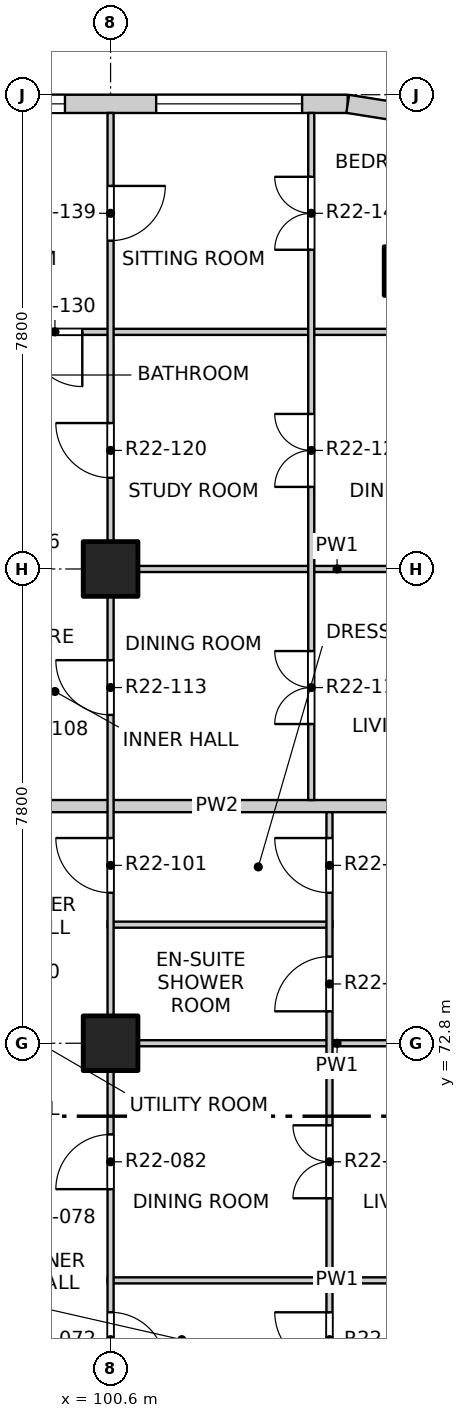
"""IFC4 building model, lengths in metres.
Left out: names, types, materials, properties, quantities, classifications, styles, units other than length and angle.
Written with IfcOpenShell. Run it as: python <this file> out.ifc"""

import sys

from ifc_helpers import new_model, si_unit, direction, frame, frame_2d, origin, origin_2d, place, context, subcontext, project, spatial, rectangle, extrude, element, fill, save


model = new_model("IFC4")
c1 = context("Model", 3, precision=1e-05, world=origin(), true_north=direction((0.0, 1.0)))
c2 = subcontext(c1, "Body", "Model", "MODEL_VIEW")
j1 = project(units=[si_unit("LENGTHUNIT", "METRE"), si_unit("PLANEANGLEUNIT", "RADIAN")], contexts=[c1])
p1 = place(None, origin())
s1 = spatial("IfcSite", under=j1, at=p1, CompositionType="ELEMENT")
p2 = place(p1, origin())
s2 = spatial("IfcBuilding", under=s1, at=p2, CompositionType="ELEMENT")
p3 = place(p2, frame((0.0, 0.0, 224.5)))
s3 = spatial("IfcBuildingStorey", under=s2, at=p3, CompositionType="ELEMENT", Elevation=224.5)
p4 = place(p3, frame((105.5, 85.5, -0.25), z_axis=(0.0, 0.0, 1.0), x_axis=(1.0, 0.0, 0.0)))
e1 = element("IfcColumn", 1, at=p4, inside=s3, PredefinedType="COLUMN", context=c2, shape_type="SweptSolid", body=[
    extrude(rectangle(XDim=0.8, YDim=0.8, at=origin_2d()), origin(), (0.0, 0.0, 1.0), 3.4),
])
for number, where, z_axis, x_axis in (
    (2, (100.6, 72.8, -0.25), (0.0, 0.0, 1.0), (1.0, 0.0, 0.0)),
    (3, (100.6, 80.6, -0.25), (0.0, 0.0, 1.0), (1.0, 0.0, 0.0)),
):
    element("IfcColumn", number, at=place(p3, frame(where, z_axis=z_axis, x_axis=x_axis)), inside=s3, PredefinedType="COLUMN", context=c2, shape_type="SweptSolid", body=[
        extrude(rectangle(XDim=0.9, YDim=0.9, at=origin_2d()), origin(), (0.0, 0.0, 1.0), 3.4),
    ])
p5 = place(p3, frame((97.1, 88.25, 0.0), z_axis=(0.0, 0.0, 1.0), x_axis=(1.0, 0.0, 0.0)))
e4 = element("IfcWall", 4, at=p5, inside=s3, PredefinedType="SOLIDWALL", context=c2, shape_type="SweptSolid", body=[
    extrude(rectangle(XDim=7.4, YDim=0.3, at=frame_2d((3.7, 0.0))), origin(), (0.0, 0.0, 1.0), 2.7),
])
p6 = place(p5, frame((0.35, 0.0, 0.9)))
e5 = element("IfcOpeningElement", 5, at=p6, cuts=e4, PredefinedType="OPENING", context=c2, shape_type="SweptSolid", body=[
    extrude(rectangle(XDim=2.4, YDim=1.8, at=frame_2d((1.2, 0.9))), frame((0.0, 0.16, 0.0), z_axis=(0.0, -1.0, 0.0), x_axis=(1.0, 0.0, 0.0)), (0.0, 0.0, 1.0), 0.32),
])
p7 = place(p5, frame((4.25, 0.0, 0.9)))
e6 = element("IfcOpeningElement", 6, at=p7, cuts=e4, PredefinedType="OPENING", context=c2, shape_type="SweptSolid", body=[
    extrude(rectangle(XDim=2.4, YDim=1.8, at=frame_2d((1.2, 0.9))), frame((0.0, 0.16, 0.0), z_axis=(0.0, -1.0, 0.0), x_axis=(1.0, 0.0, 0.0)), (0.0, 0.0, 1.0), 0.32),
])
p8 = place(p3, frame((105.659, 88.066, 0.0), z_axis=(0.0, 0.0, 1.0), x_axis=(-0.987678452879, 0.156496880861, 0.0)))
e7 = element("IfcWall", 7, at=p8, inside=s3, PredefinedType="SOLIDWALL", context=c2, shape_type="SweptSolid", body=[
    extrude(rectangle(XDim=1.173, YDim=0.3, at=frame_2d((0.586, 0.0))), origin(), (0.0, 0.0, 1.0), 2.7),
])
p9 = place(p3, frame((100.55, 68.9, 0.0), z_axis=(0.0, 0.0, 1.0), x_axis=(1.0, 0.0, 0.0)))
e8 = element("IfcWall", 8, at=p9, inside=s3, PredefinedType="PARTITIONING", context=c2, shape_type="SweptSolid", body=[
    extrude(rectangle(XDim=7.55, YDim=0.1, at=frame_2d((3.775, 0.0))), origin(), (0.0, 0.0, 1.0), 2.55),
])
p10 = place(p3, frame((100.55, 72.8, 0.0), z_axis=(0.0, 0.0, 1.0), x_axis=(1.0, 0.0, 0.0)))
e9 = element("IfcWall", 9, at=p10, inside=s3, PredefinedType="PARTITIONING", context=c2, shape_type="SweptSolid", body=[
    extrude(rectangle(XDim=7.55, YDim=0.1, at=frame_2d((3.775, 0.0))), origin(), (0.0, 0.0, 1.0), 3.15),
])
p11 = place(p3, frame((100.55, 74.75, 0.0), z_axis=(0.0, 0.0, 1.0), x_axis=(1.0, 0.0, 0.0)))
e10 = element("IfcWall", 10, at=p11, inside=s3, PredefinedType="PARTITIONING", context=c2, shape_type="SweptSolid", body=[
    extrude(rectangle(XDim=3.7, YDim=0.1, at=frame_2d((1.85, 0.0))), origin(), (0.0, 0.0, 1.0), 3.15),
])
p12 = place(p3, frame((96.6, 76.7, 0.0), z_axis=(0.0, 0.0, 1.0), x_axis=(1.0, 0.0, 0.0)))
e11 = element("IfcWall", 11, at=p12, inside=s3, PredefinedType="PARTITIONING", context=c2, shape_type="SweptSolid", body=[
    extrude(rectangle(XDim=11.5, YDim=0.2, at=frame_2d((5.75, 0.0))), origin(), (0.0, 0.0, 1.0), 2.55),
])
p13 = place(p3, frame((100.55, 80.6, 0.0), z_axis=(0.0, 0.0, 1.0), x_axis=(1.0, 0.0, 0.0)))
e12 = element("IfcWall", 12, at=p13, inside=s3, PredefinedType="PARTITIONING", context=c2, shape_type="SweptSolid", body=[
    extrude(rectangle(XDim=7.55, YDim=0.1, at=frame_2d((3.775, 0.0))), origin(), (0.0, 0.0, 1.0), 3.15),
])
p14 = place(p3, frame((96.6, 84.5, 0.0), z_axis=(0.0, 0.0, 1.0), x_axis=(1.0, 0.0, 0.0)))
e13 = element("IfcWall", 13, at=p14, inside=s3, PredefinedType="PARTITIONING", context=c2, shape_type="SweptSolid", body=[
    extrude(rectangle(XDim=11.5, YDim=0.1, at=frame_2d((5.75, 0.0))), origin(), (0.0, 0.0, 1.0), 3.15),
])
p15 = place(p14, frame((2.635, 0.0, 0.0)))
e14 = element("IfcOpeningElement", 14, at=p15, cuts=e13, PredefinedType="OPENING", context=c2, shape_type="SweptSolid", body=[
    extrude(rectangle(XDim=0.9, YDim=2.1, at=frame_2d((0.45, 1.05))), frame((0.0, 0.06, 0.0), z_axis=(0.0, -1.0, 0.0), x_axis=(1.0, 0.0, 0.0)), (0.0, 0.0, 1.0), 0.12),
])
p16 = place(p3, frame((100.6, 41.9, 0.0), z_axis=(0.0, 0.0, 1.0), x_axis=(0.0, 1.0, 0.0)))
e15 = element("IfcWall", 15, at=p16, inside=s3, PredefinedType="PARTITIONING", context=c2, shape_type="SweptSolid", body=[
    extrude(rectangle(XDim=46.2, YDim=0.1, at=frame_2d((23.1, 0.0))), origin(), (0.0, 0.0, 1.0), 3.15),
])
p17 = place(p16, frame((1.2, 0.0, 0.0)))
e16 = element("IfcOpeningElement", 16, at=p17, cuts=e15, PredefinedType="OPENING", context=c2, shape_type="SweptSolid", body=[
    extrude(rectangle(XDim=0.9, YDim=2.1, at=frame_2d((0.45, 1.05))), frame((0.0, 0.06, 0.0), z_axis=(0.0, -1.0, 0.0), x_axis=(1.0, 0.0, 0.0)), (0.0, 0.0, 1.0), 0.12),
])
p18 = place(p16, frame((6.025, 0.0, 0.0)))
e17 = element("IfcOpeningElement", 17, at=p18, cuts=e15, PredefinedType="OPENING", context=c2, shape_type="SweptSolid", body=[
    extrude(rectangle(XDim=0.9, YDim=2.1, at=frame_2d((0.45, 1.05))), frame((0.0, 0.06, 0.0), z_axis=(0.0, -1.0, 0.0), x_axis=(1.0, 0.0, 0.0)), (0.0, 0.0, 1.0), 0.12),
])
p19 = place(p16, frame((9.0, 0.0, 0.0)))
e18 = element("IfcOpeningElement", 18, at=p19, cuts=e15, PredefinedType="OPENING", context=c2, shape_type="SweptSolid", body=[
    extrude(rectangle(XDim=0.9, YDim=2.1, at=frame_2d((0.45, 1.05))), frame((0.0, 0.06, 0.0), z_axis=(0.0, -1.0, 0.0), x_axis=(1.0, 0.0, 0.0)), (0.0, 0.0, 1.0), 0.12),
])
p20 = place(p16, frame((12.9, 0.0, 0.0)))
e19 = element("IfcOpeningElement", 19, at=p20, cuts=e15, PredefinedType="OPENING", context=c2, shape_type="SweptSolid", body=[
    extrude(rectangle(XDim=0.9, YDim=2.1, at=frame_2d((0.45, 1.05))), frame((0.0, 0.06, 0.0), z_axis=(0.0, -1.0, 0.0), x_axis=(1.0, 0.0, 0.0)), (0.0, 0.0, 1.0), 0.12),
])
p21 = place(p16, frame((17.775, 0.0, 0.0)))
e20 = element("IfcOpeningElement", 20, at=p21, cuts=e15, PredefinedType="OPENING", context=c2, shape_type="SweptSolid", body=[
    extrude(rectangle(XDim=0.9, YDim=2.1, at=frame_2d((0.45, 1.05))), frame((0.0, 0.06, 0.0), z_axis=(0.0, -1.0, 0.0), x_axis=(1.0, 0.0, 0.0)), (0.0, 0.0, 1.0), 0.12),
])
p22 = place(p16, frame((21.625, 0.0, 0.0)))
e21 = element("IfcOpeningElement", 21, at=p22, cuts=e15, PredefinedType="OPENING", context=c2, shape_type="SweptSolid", body=[
    extrude(rectangle(XDim=0.9, YDim=2.1, at=frame_2d((0.45, 1.05))), frame((0.0, 0.06, 0.0), z_axis=(0.0, -1.0, 0.0), x_axis=(1.0, 0.0, 0.0)), (0.0, 0.0, 1.0), 0.12),
])
p23 = place(p16, frame((25.575, 0.0, 0.0)))
e22 = element("IfcOpeningElement", 22, at=p23, cuts=e15, PredefinedType="OPENING", context=c2, shape_type="SweptSolid", body=[
    extrude(rectangle(XDim=0.9, YDim=2.1, at=frame_2d((0.45, 1.05))), frame((0.0, 0.06, 0.0), z_axis=(0.0, -1.0, 0.0), x_axis=(1.0, 0.0, 0.0)), (0.0, 0.0, 1.0), 0.12),
])
p24 = place(p16, frame((28.5, 0.0, 0.0)))
e23 = element("IfcOpeningElement", 23, at=p24, cuts=e15, PredefinedType="OPENING", context=c2, shape_type="SweptSolid", body=[
    extrude(rectangle(XDim=0.9, YDim=2.1, at=frame_2d((0.45, 1.05))), frame((0.0, 0.06, 0.0), z_axis=(0.0, -1.0, 0.0), x_axis=(1.0, 0.0, 0.0)), (0.0, 0.0, 1.0), 0.12),
])
p25 = place(p16, frame((33.375, 0.0, 0.0)))
e24 = element("IfcOpeningElement", 24, at=p25, cuts=e15, PredefinedType="OPENING", context=c2, shape_type="SweptSolid", body=[
    extrude(rectangle(XDim=0.9, YDim=2.1, at=frame_2d((0.45, 1.05))), frame((0.0, 0.06, 0.0), z_axis=(0.0, -1.0, 0.0), x_axis=(1.0, 0.0, 0.0)), (0.0, 0.0, 1.0), 0.12),
])
p26 = place(p16, frame((36.3, 0.0, 0.0)))
e25 = element("IfcOpeningElement", 25, at=p26, cuts=e15, PredefinedType="OPENING", context=c2, shape_type="SweptSolid", body=[
    extrude(rectangle(XDim=0.9, YDim=2.1, at=frame_2d((0.45, 1.05))), frame((0.0, 0.06, 0.0), z_axis=(0.0, -1.0, 0.0), x_axis=(1.0, 0.0, 0.0)), (0.0, 0.0, 1.0), 0.12),
])
p27 = place(p16, frame((40.2, 0.0, 0.0)))
e26 = element("IfcOpeningElement", 26, at=p27, cuts=e15, PredefinedType="OPENING", context=c2, shape_type="SweptSolid", body=[
    extrude(rectangle(XDim=0.9, YDim=2.1, at=frame_2d((0.45, 1.05))), frame((0.0, 0.06, 0.0), z_axis=(0.0, -1.0, 0.0), x_axis=(1.0, 0.0, 0.0)), (0.0, 0.0, 1.0), 0.12),
])
p28 = place(p16, frame((44.1, 0.0, 0.0)))
e27 = element("IfcOpeningElement", 27, at=p28, cuts=e15, PredefinedType="OPENING", context=c2, shape_type="SweptSolid", body=[
    extrude(rectangle(XDim=0.9, YDim=2.1, at=frame_2d((0.45, 1.05))), frame((0.0, 0.06, 0.0), z_axis=(0.0, -1.0, 0.0), x_axis=(1.0, 0.0, 0.0)), (0.0, 0.0, 1.0), 0.12),
])
p29 = place(p3, frame((103.9, 76.8, 0.0), z_axis=(0.0, 0.0, 1.0), x_axis=(0.0, 1.0, 0.0)))
e28 = element("IfcWall", 28, at=p29, inside=s3, PredefinedType="PARTITIONING", context=c2, shape_type="SweptSolid", body=[
    extrude(rectangle(XDim=11.3, YDim=0.1, at=frame_2d((5.65, 0.0))), origin(), (0.0, 0.0, 1.0), 3.15),
])
p30 = place(p29, frame((1.25, 0.0, 0.0)))
e29 = element("IfcOpeningElement", 29, at=p30, cuts=e28, PredefinedType="OPENING", context=c2, shape_type="SweptSolid", body=[
    extrude(rectangle(XDim=1.2, YDim=2.1, at=frame_2d((0.6, 1.05))), frame((0.0, 0.06, 0.0), z_axis=(0.0, -1.0, 0.0), x_axis=(1.0, 0.0, 0.0)), (0.0, 0.0, 1.0), 0.12),
])
p31 = place(p29, frame((5.15, 0.0, 0.0)))
e30 = element("IfcOpeningElement", 30, at=p31, cuts=e28, PredefinedType="OPENING", context=c2, shape_type="SweptSolid", body=[
    extrude(rectangle(XDim=1.2, YDim=2.1, at=frame_2d((0.6, 1.05))), frame((0.0, 0.06, 0.0), z_axis=(0.0, -1.0, 0.0), x_axis=(1.0, 0.0, 0.0)), (0.0, 0.0, 1.0), 0.12),
])
p32 = place(p29, frame((9.05, 0.0, 0.0)))
e31 = element("IfcOpeningElement", 31, at=p32, cuts=e28, PredefinedType="OPENING", context=c2, shape_type="SweptSolid", body=[
    extrude(rectangle(XDim=1.2, YDim=2.1, at=frame_2d((0.6, 1.05))), frame((0.0, 0.06, 0.0), z_axis=(0.0, -1.0, 0.0), x_axis=(1.0, 0.0, 0.0)), (0.0, 0.0, 1.0), 0.12),
])
p33 = place(p3, frame((104.2, 41.9, 0.0), z_axis=(0.0, 0.0, 1.0), x_axis=(0.0, 1.0, 0.0)))
e32 = element("IfcWall", 32, at=p33, inside=s3, PredefinedType="PARTITIONING", context=c2, shape_type="SweptSolid", body=[
    extrude(rectangle(XDim=34.7, YDim=0.1, at=frame_2d((17.35, 0.0))), origin(), (0.0, 0.0, 1.0), 3.15),
])
p34 = place(p33, frame((1.05, 0.0, 0.0)))
e33 = element("IfcOpeningElement", 33, at=p34, cuts=e32, PredefinedType="OPENING", context=c2, shape_type="SweptSolid", body=[
    extrude(rectangle(XDim=1.2, YDim=2.1, at=frame_2d((0.6, 1.05))), frame((0.0, 0.06, 0.0), z_axis=(0.0, -1.0, 0.0), x_axis=(1.0, 0.0, 0.0)), (0.0, 0.0, 1.0), 0.12),
])
p35 = place(p33, frame((4.125, 0.0, 0.0)))
e34 = element("IfcOpeningElement", 34, at=p35, cuts=e32, PredefinedType="OPENING", context=c2, shape_type="SweptSolid", body=[
    extrude(rectangle(XDim=0.9, YDim=2.1, at=frame_2d((0.45, 1.05))), frame((0.0, 0.06, 0.0), z_axis=(0.0, -1.0, 0.0), x_axis=(1.0, 0.0, 0.0)), (0.0, 0.0, 1.0), 0.12),
])
p36 = place(p33, frame((6.075, 0.0, 0.0)))
e35 = element("IfcOpeningElement", 35, at=p36, cuts=e32, PredefinedType="OPENING", context=c2, shape_type="SweptSolid", body=[
    extrude(rectangle(XDim=0.9, YDim=2.1, at=frame_2d((0.45, 1.05))), frame((0.0, 0.06, 0.0), z_axis=(0.0, -1.0, 0.0), x_axis=(1.0, 0.0, 0.0)), (0.0, 0.0, 1.0), 0.12),
])
p37 = place(p33, frame((8.85, 0.0, 0.0)))
e36 = element("IfcOpeningElement", 36, at=p37, cuts=e32, PredefinedType="OPENING", context=c2, shape_type="SweptSolid", body=[
    extrude(rectangle(XDim=1.2, YDim=2.1, at=frame_2d((0.6, 1.05))), frame((0.0, 0.06, 0.0), z_axis=(0.0, -1.0, 0.0), x_axis=(1.0, 0.0, 0.0)), (0.0, 0.0, 1.0), 0.12),
])
p38 = place(p33, frame((12.75, 0.0, 0.0)))
e37 = element("IfcOpeningElement", 37, at=p38, cuts=e32, PredefinedType="OPENING", context=c2, shape_type="SweptSolid", body=[
    extrude(rectangle(XDim=1.2, YDim=2.1, at=frame_2d((0.6, 1.05))), frame((0.0, 0.06, 0.0), z_axis=(0.0, -1.0, 0.0), x_axis=(1.0, 0.0, 0.0)), (0.0, 0.0, 1.0), 0.12),
])
p39 = place(p33, frame((15.825, 0.0, 0.0)))
e38 = element("IfcOpeningElement", 38, at=p39, cuts=e32, PredefinedType="OPENING", context=c2, shape_type="SweptSolid", body=[
    extrude(rectangle(XDim=0.9, YDim=2.1, at=frame_2d((0.45, 1.05))), frame((0.0, 0.06, 0.0), z_axis=(0.0, -1.0, 0.0), x_axis=(1.0, 0.0, 0.0)), (0.0, 0.0, 1.0), 0.12),
])
p40 = place(p33, frame((17.775, 0.0, 0.0)))
e39 = element("IfcOpeningElement", 39, at=p40, cuts=e32, PredefinedType="OPENING", context=c2, shape_type="SweptSolid", body=[
    extrude(rectangle(XDim=0.9, YDim=2.1, at=frame_2d((0.45, 1.05))), frame((0.0, 0.06, 0.0), z_axis=(0.0, -1.0, 0.0), x_axis=(1.0, 0.0, 0.0)), (0.0, 0.0, 1.0), 0.12),
])
p41 = place(p33, frame((19.725, 0.0, 0.0)))
e40 = element("IfcOpeningElement", 40, at=p41, cuts=e32, PredefinedType="OPENING", context=c2, shape_type="SweptSolid", body=[
    extrude(rectangle(XDim=0.9, YDim=2.1, at=frame_2d((0.45, 1.05))), frame((0.0, 0.06, 0.0), z_axis=(0.0, -1.0, 0.0), x_axis=(1.0, 0.0, 0.0)), (0.0, 0.0, 1.0), 0.12),
])
p42 = place(p33, frame((21.675, 0.0, 0.0)))
e41 = element("IfcOpeningElement", 41, at=p42, cuts=e32, PredefinedType="OPENING", context=c2, shape_type="SweptSolid", body=[
    extrude(rectangle(XDim=0.9, YDim=2.1, at=frame_2d((0.45, 1.05))), frame((0.0, 0.06, 0.0), z_axis=(0.0, -1.0, 0.0), x_axis=(1.0, 0.0, 0.0)), (0.0, 0.0, 1.0), 0.12),
])
p43 = place(p33, frame((23.625, 0.0, 0.0)))
e42 = element("IfcOpeningElement", 42, at=p43, cuts=e32, PredefinedType="OPENING", context=c2, shape_type="SweptSolid", body=[
    extrude(rectangle(XDim=0.9, YDim=2.1, at=frame_2d((0.45, 1.05))), frame((0.0, 0.06, 0.0), z_axis=(0.0, -1.0, 0.0), x_axis=(1.0, 0.0, 0.0)), (0.0, 0.0, 1.0), 0.12),
])
p44 = place(p33, frame((25.575, 0.0, 0.0)))
e43 = element("IfcOpeningElement", 43, at=p44, cuts=e32, PredefinedType="OPENING", context=c2, shape_type="SweptSolid", body=[
    extrude(rectangle(XDim=0.9, YDim=2.1, at=frame_2d((0.45, 1.05))), frame((0.0, 0.06, 0.0), z_axis=(0.0, -1.0, 0.0), x_axis=(1.0, 0.0, 0.0)), (0.0, 0.0, 1.0), 0.12),
])
p45 = place(p33, frame((28.35, 0.0, 0.0)))
e44 = element("IfcOpeningElement", 44, at=p45, cuts=e32, PredefinedType="OPENING", context=c2, shape_type="SweptSolid", body=[
    extrude(rectangle(XDim=1.2, YDim=2.1, at=frame_2d((0.6, 1.05))), frame((0.0, 0.06, 0.0), z_axis=(0.0, -1.0, 0.0), x_axis=(1.0, 0.0, 0.0)), (0.0, 0.0, 1.0), 0.12),
])
p46 = place(p33, frame((31.425, 0.0, 0.0)))
e45 = element("IfcOpeningElement", 45, at=p46, cuts=e32, PredefinedType="OPENING", context=c2, shape_type="SweptSolid", body=[
    extrude(rectangle(XDim=0.9, YDim=2.1, at=frame_2d((0.45, 1.05))), frame((0.0, 0.06, 0.0), z_axis=(0.0, -1.0, 0.0), x_axis=(1.0, 0.0, 0.0)), (0.0, 0.0, 1.0), 0.12),
])
p47 = place(p33, frame((33.375, 0.0, 0.0)))
e46 = element("IfcOpeningElement", 46, at=p47, cuts=e32, PredefinedType="OPENING", context=c2, shape_type="SweptSolid", body=[
    extrude(rectangle(XDim=0.9, YDim=2.1, at=frame_2d((0.45, 1.05))), frame((0.0, 0.06, 0.0), z_axis=(0.0, -1.0, 0.0), x_axis=(1.0, 0.0, 0.0)), (0.0, 0.0, 1.0), 0.12),
])
p48 = place(p6, origin())
e47 = element("IfcWindow", 47, at=p48, inside=s3, PartitioningType="DOUBLE_PANEL_VERTICAL", PredefinedType="WINDOW", context=c2, shape_type="SweptSolid", body=[
    extrude(rectangle(XDim=2.4, YDim=1.8, at=frame_2d((1.2, 0.9))), frame((0.0, 0.03, 0.0), z_axis=(0.0, -1.0, 0.0), x_axis=(1.0, 0.0, 0.0)), (0.0, 0.0, 1.0), 0.06),
])
fill(e5, e47)
p49 = place(p7, origin())
e48 = element("IfcWindow", 48, at=p49, inside=s3, PartitioningType="DOUBLE_PANEL_VERTICAL", PredefinedType="WINDOW", context=c2, shape_type="SweptSolid", body=[
    extrude(rectangle(XDim=2.4, YDim=1.8, at=frame_2d((1.2, 0.9))), frame((0.0, 0.03, 0.0), z_axis=(0.0, -1.0, 0.0), x_axis=(1.0, 0.0, 0.0)), (0.0, 0.0, 1.0), 0.06),
])
fill(e6, e48)
p50 = place(p23, origin())
e49 = element("IfcDoor", 49, at=p50, inside=s3, OperationType="SINGLE_SWING_RIGHT", PredefinedType="DOOR", context=c2, shape_type="SweptSolid", body=[
    extrude(rectangle(XDim=0.9, YDim=2.1, at=frame_2d((0.45, 1.05))), frame((0.0, 0.025, 0.0), z_axis=(0.0, -1.0, 0.0), x_axis=(1.0, 0.0, 0.0)), (0.0, 0.0, 1.0), 0.05),
])
fill(e22, e49)
p51 = place(p44, origin())
e50 = element("IfcDoor", 50, at=p51, inside=s3, OperationType="SINGLE_SWING_RIGHT", PredefinedType="DOOR", context=c2, shape_type="SweptSolid", body=[
    extrude(rectangle(XDim=0.9, YDim=2.1, at=frame_2d((0.45, 1.05))), frame((0.0, 0.025, 0.0), z_axis=(0.0, -1.0, 0.0), x_axis=(1.0, 0.0, 0.0)), (0.0, 0.0, 1.0), 0.05),
])
fill(e43, e50)
p52 = place(p24, origin())
e51 = element("IfcDoor", 51, at=p52, inside=s3, OperationType="SINGLE_SWING_LEFT", PredefinedType="DOOR", context=c2, shape_type="SweptSolid", body=[
    extrude(rectangle(XDim=0.9, YDim=2.1, at=frame_2d((0.45, 1.05))), frame((0.0, 0.025, 0.0), z_axis=(0.0, -1.0, 0.0), x_axis=(1.0, 0.0, 0.0)), (0.0, 0.0, 1.0), 0.05),
])
fill(e23, e51)
p53 = place(p45, origin())
e52 = element("IfcDoor", 52, at=p53, inside=s3, OperationType="DOUBLE_DOOR_SINGLE_SWING", PredefinedType="DOOR", context=c2, shape_type="SweptSolid", body=[
    extrude(rectangle(XDim=1.2, YDim=2.1, at=frame_2d((0.6, 1.05))), frame((0.0, 0.025, 0.0), z_axis=(0.0, -1.0, 0.0), x_axis=(1.0, 0.0, 0.0)), (0.0, 0.0, 1.0), 0.05),
])
fill(e44, e52)
p54 = place(p46, origin())
e53 = element("IfcDoor", 53, at=p54, inside=s3, OperationType="SINGLE_SWING_LEFT", PredefinedType="DOOR", context=c2, shape_type="SweptSolid", body=[
    extrude(rectangle(XDim=0.9, YDim=2.1, at=frame_2d((0.45, 1.05))), frame((0.0, 0.025, 0.0), z_axis=(0.0, -1.0, 0.0), x_axis=(1.0, 0.0, 0.0)), (0.0, 0.0, 1.0), 0.05),
])
fill(e45, e53)
p55 = place(p25, origin())
e54 = element("IfcDoor", 54, at=p55, inside=s3, OperationType="SINGLE_SWING_RIGHT", PredefinedType="DOOR", context=c2, shape_type="SweptSolid", body=[
    extrude(rectangle(XDim=0.9, YDim=2.1, at=frame_2d((0.45, 1.05))), frame((0.0, 0.025, 0.0), z_axis=(0.0, -1.0, 0.0), x_axis=(1.0, 0.0, 0.0)), (0.0, 0.0, 1.0), 0.05),
])
fill(e24, e54)
p56 = place(p47, origin())
e55 = element("IfcDoor", 55, at=p56, inside=s3, OperationType="SINGLE_SWING_RIGHT", PredefinedType="DOOR", context=c2, shape_type="SweptSolid", body=[
    extrude(rectangle(XDim=0.9, YDim=2.1, at=frame_2d((0.45, 1.05))), frame((0.0, 0.025, 0.0), z_axis=(0.0, -1.0, 0.0), x_axis=(1.0, 0.0, 0.0)), (0.0, 0.0, 1.0), 0.05),
])
fill(e46, e55)
p57 = place(p26, origin())
e56 = element("IfcDoor", 56, at=p57, inside=s3, OperationType="SINGLE_SWING_RIGHT", PredefinedType="DOOR", context=c2, shape_type="SweptSolid", body=[
    extrude(rectangle(XDim=0.9, YDim=2.1, at=frame_2d((0.45, 1.05))), frame((0.0, 0.025, 0.0), z_axis=(0.0, -1.0, 0.0), x_axis=(1.0, 0.0, 0.0)), (0.0, 0.0, 1.0), 0.05),
])
fill(e25, e56)
p58 = place(p30, origin())
e57 = element("IfcDoor", 57, at=p58, inside=s3, OperationType="DOUBLE_DOOR_SINGLE_SWING", PredefinedType="DOOR", context=c2, shape_type="SweptSolid", body=[
    extrude(rectangle(XDim=1.2, YDim=2.1, at=frame_2d((0.6, 1.05))), frame((0.0, 0.025, 0.0), z_axis=(0.0, -1.0, 0.0), x_axis=(1.0, 0.0, 0.0)), (0.0, 0.0, 1.0), 0.05),
])
fill(e29, e57)
p59 = place(p27, origin())
e58 = element("IfcDoor", 58, at=p59, inside=s3, OperationType="SINGLE_SWING_RIGHT", PredefinedType="DOOR", context=c2, shape_type="SweptSolid", body=[
    extrude(rectangle(XDim=0.9, YDim=2.1, at=frame_2d((0.45, 1.05))), frame((0.0, 0.025, 0.0), z_axis=(0.0, -1.0, 0.0), x_axis=(1.0, 0.0, 0.0)), (0.0, 0.0, 1.0), 0.05),
])
fill(e26, e58)
p60 = place(p31, origin())
e59 = element("IfcDoor", 59, at=p60, inside=s3, OperationType="DOUBLE_DOOR_SINGLE_SWING", PredefinedType="DOOR", context=c2, shape_type="SweptSolid", body=[
    extrude(rectangle(XDim=1.2, YDim=2.1, at=frame_2d((0.6, 1.05))), frame((0.0, 0.025, 0.0), z_axis=(0.0, -1.0, 0.0), x_axis=(1.0, 0.0, 0.0)), (0.0, 0.0, 1.0), 0.05),
])
fill(e30, e59)
p61 = place(p15, origin())
e60 = element("IfcDoor", 60, at=p61, inside=s3, OperationType="SINGLE_SWING_LEFT", PredefinedType="DOOR", context=c2, shape_type="SweptSolid", body=[
    extrude(rectangle(XDim=0.9, YDim=2.1, at=frame_2d((0.45, 1.05))), frame((0.0, 0.025, 0.0), z_axis=(0.0, -1.0, 0.0), x_axis=(1.0, 0.0, 0.0)), (0.0, 0.0, 1.0), 0.05),
])
fill(e14, e60)
p62 = place(p28, origin())
e61 = element("IfcDoor", 61, at=p62, inside=s3, OperationType="SINGLE_SWING_LEFT", PredefinedType="DOOR", context=c2, shape_type="SweptSolid", body=[
    extrude(rectangle(XDim=0.9, YDim=2.1, at=frame_2d((0.45, 1.05))), frame((0.0, 0.025, 0.0), z_axis=(0.0, -1.0, 0.0), x_axis=(1.0, 0.0, 0.0)), (0.0, 0.0, 1.0), 0.05),
])
fill(e27, e61)
p63 = place(p32, origin())
e62 = element("IfcDoor", 62, at=p63, inside=s3, OperationType="DOUBLE_DOOR_SINGLE_SWING", PredefinedType="DOOR", context=c2, shape_type="SweptSolid", body=[
    extrude(rectangle(XDim=1.2, YDim=2.1, at=frame_2d((0.6, 1.05))), frame((0.0, 0.025, 0.0), z_axis=(0.0, -1.0, 0.0), x_axis=(1.0, 0.0, 0.0)), (0.0, 0.0, 1.0), 0.05),
])
fill(e31, e62)
save(model, sys.argv[1])
